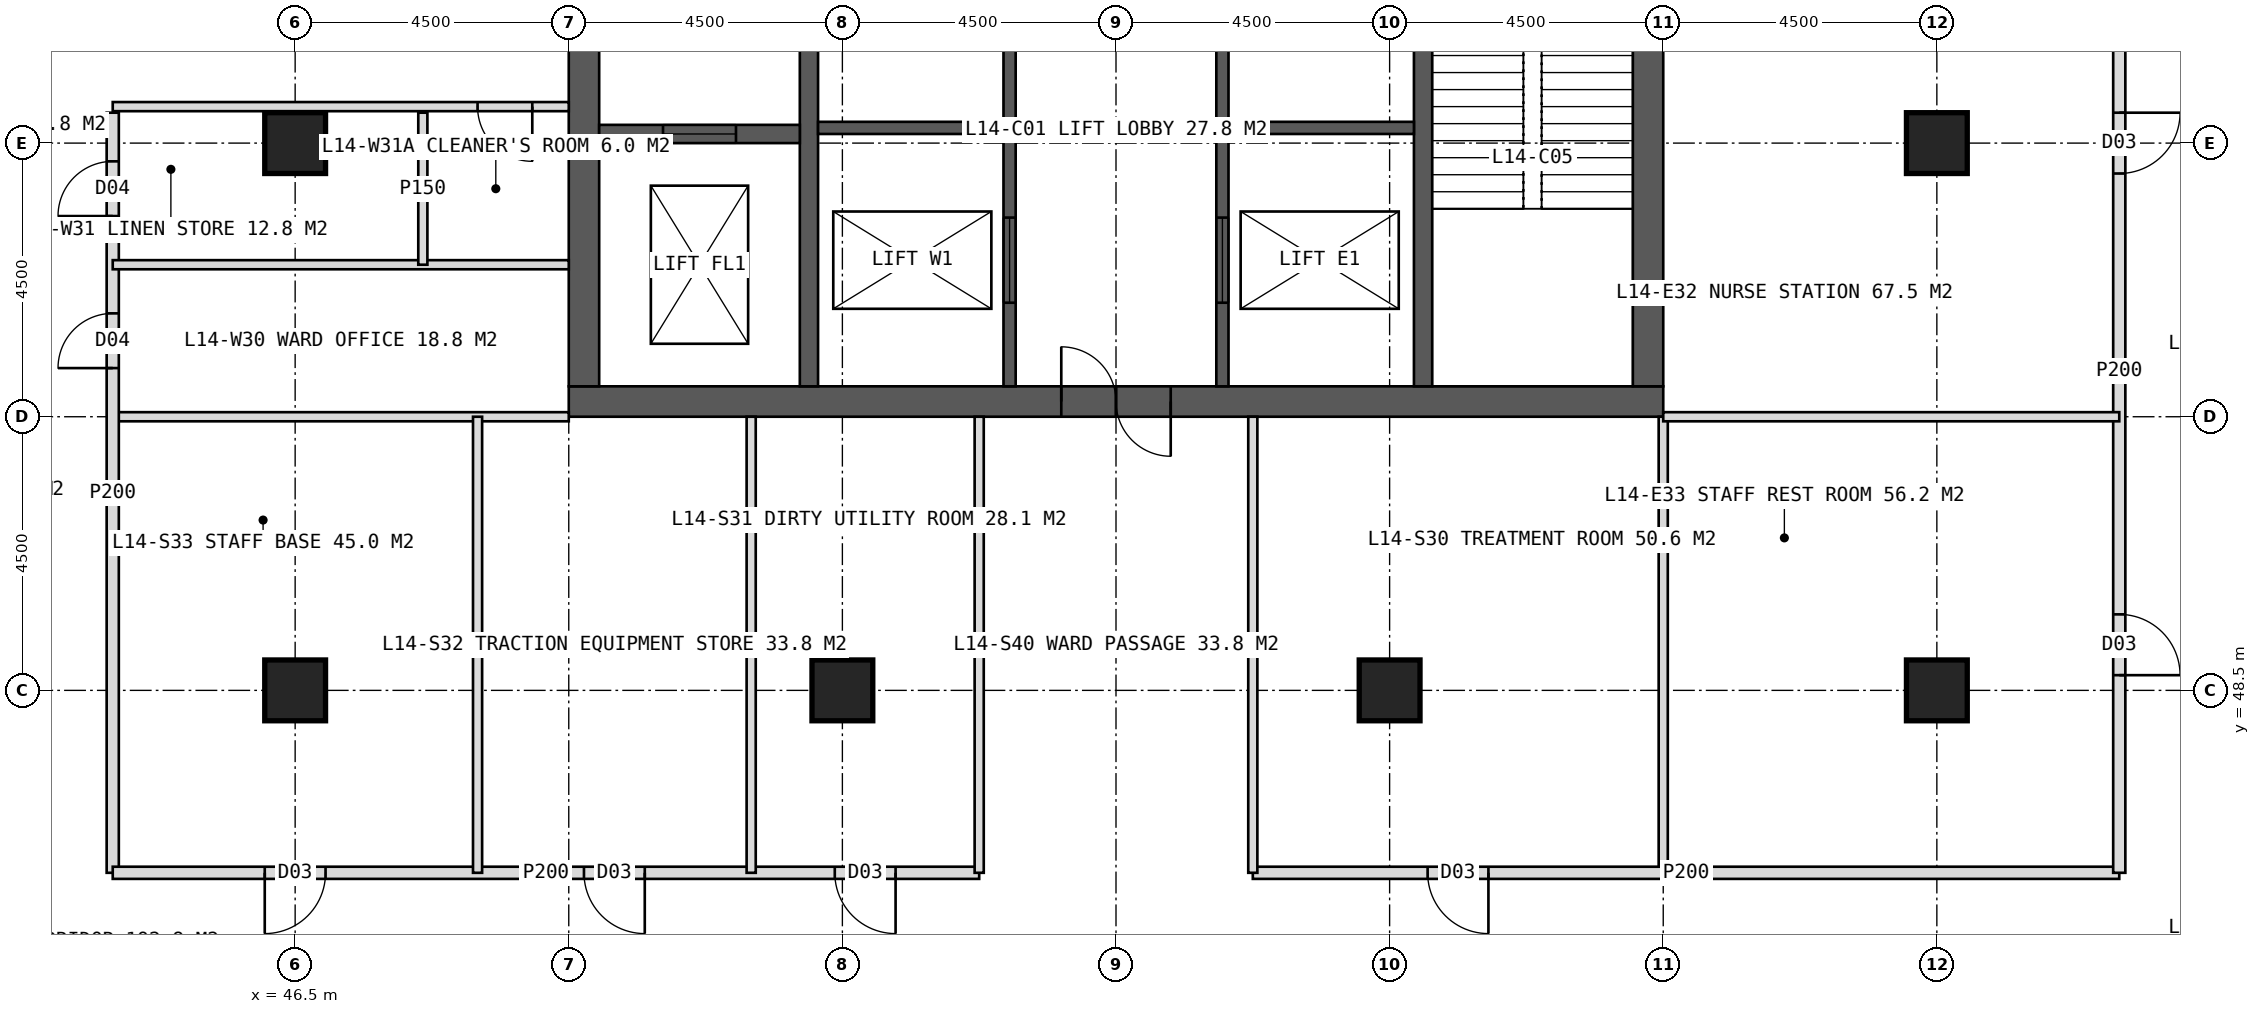
"""IFC4 building model, lengths in metres.
Left out: names, types, materials, properties, quantities, classifications, styles, units other than length and angle.
Written with IfcOpenShell. Run it as: python <this file> out.ifc"""

import sys

from ifc_helpers import new_model, si_unit, direction, frame, frame_2d, origin, origin_2d, place, context, subcontext, project, spatial, rectangle, hollow_rectangle, extrude, element, fill, save


model = new_model("IFC4")
c1 = context("Model", 3, precision=1e-05, world=origin(), true_north=direction((0.0, 1.0)))
c2 = subcontext(c1, "Body", "Model", "MODEL_VIEW")
j1 = project(units=[si_unit("LENGTHUNIT", "METRE"), si_unit("PLANEANGLEUNIT", "RADIAN")], contexts=[c1])
p1 = place(None, origin())
s1 = spatial("IfcSite", under=j1, at=p1, CompositionType="ELEMENT")
p2 = place(p1, origin())
s2 = spatial("IfcBuilding", under=s1, at=p2, CompositionType="ELEMENT")
p3 = place(p2, frame((0.0, 0.0, 63.0)))
s3 = spatial("IfcBuildingStorey", under=s2, at=p3, CompositionType="ELEMENT", Elevation=63.0)
p4 = place(p3, frame((51.0, 53.25, 0.0), z_axis=(0.0, 0.0, 1.0), x_axis=(1.0, 0.0, 0.0)))
e1 = element("IfcWall", 1, at=p4, inside=s3, PredefinedType="SHEAR", context=c2, shape_type="SweptSolid", body=[
    extrude(rectangle(XDim=18.0, YDim=0.5, at=frame_2d((9.0, 0.0))), origin(), (0.0, 0.0, 1.0), 4.0),
])
p5 = place(p4, frame((8.1, 0.0, 0.0)))
e2 = element("IfcOpeningElement", 2, at=p5, cuts=e1, PredefinedType="OPENING", context=c2, shape_type="SweptSolid", body=[
    extrude(rectangle(XDim=1.8, YDim=2.2, at=frame_2d((0.9, 1.1))), frame((0.0, 0.26, 0.0), z_axis=(0.0, -1.0, 0.0), x_axis=(1.0, 0.0, 0.0)), (0.0, 0.0, 1.0), 0.52),
])
p6 = place(p3, frame((51.25, 53.5, 0.0), z_axis=(0.0, 0.0, 1.0), x_axis=(0.0, 1.0, 0.0)))
e3 = element("IfcWall", 3, at=p6, inside=s3, PredefinedType="SHEAR", context=c2, shape_type="SweptSolid", body=[
    extrude(rectangle(XDim=17.0, YDim=0.5, at=frame_2d((8.5, 0.0))), origin(), (0.0, 0.0, 1.0), 4.0),
])
p7 = place(p6, frame((6.0, 0.0, 0.0)))
e4 = element("IfcOpeningElement", 4, at=p7, cuts=e3, PredefinedType="OPENING", context=c2, shape_type="SweptSolid", body=[
    extrude(rectangle(XDim=1.5, YDim=2.2, at=frame_2d((0.75, 1.1))), frame((0.0, 0.26, 0.0), z_axis=(0.0, -1.0, 0.0), x_axis=(1.0, 0.0, 0.0)), (0.0, 0.0, 1.0), 0.52),
])
p8 = place(p3, frame((68.75, 53.5, 0.0), z_axis=(0.0, 0.0, 1.0), x_axis=(0.0, 1.0, 0.0)))
e5 = element("IfcWall", 5, at=p8, inside=s3, PredefinedType="SHEAR", context=c2, shape_type="SweptSolid", body=[
    extrude(rectangle(XDim=17.0, YDim=0.5, at=frame_2d((8.5, 0.0))), origin(), (0.0, 0.0, 1.0), 4.0),
])
p9 = place(p8, frame((9.5, 0.0, 0.0)))
e6 = element("IfcOpeningElement", 6, at=p9, cuts=e5, PredefinedType="OPENING", context=c2, shape_type="SweptSolid", body=[
    extrude(rectangle(XDim=1.5, YDim=2.2, at=frame_2d((0.75, 1.1))), frame((0.0, 0.26, 0.0), z_axis=(0.0, -1.0, 0.0), x_axis=(1.0, 0.0, 0.0)), (0.0, 0.0, 1.0), 0.52),
])
for number, where, z_axis, x_axis in (
    (7, (54.95, 53.5, 0.0), (0.0, 0.0, 1.0), (0.0, 1.0, 0.0)),
    (8, (65.05, 53.5, 0.0), (0.0, 0.0, 1.0), (0.0, 1.0, 0.0)),
):
    element("IfcWall", number, at=place(p3, frame(where, z_axis=z_axis, x_axis=x_axis)), inside=s3, PredefinedType="SHEAR", context=c2, shape_type="SweptSolid", body=[
        extrude(rectangle(XDim=17.0, YDim=0.3, at=frame_2d((8.5, 0.0))), origin(), (0.0, 0.0, 1.0), 4.0),
    ])
p10 = place(p3, frame((58.25, 53.5, 0.0), z_axis=(0.0, 0.0, 1.0), x_axis=(0.0, 1.0, 0.0)))
e9 = element("IfcWall", 9, at=p10, inside=s3, PredefinedType="SHEAR", context=c2, shape_type="SweptSolid", body=[
    extrude(rectangle(XDim=17.0, YDim=0.2, at=frame_2d((8.5, 0.0))), origin(), (0.0, 0.0, 1.0), 4.0),
])
p11 = place(p10, frame((1.375, 0.0, 0.0)))
e10 = element("IfcOpeningElement", 10, at=p11, cuts=e9, PredefinedType="OPENING", context=c2, shape_type="SweptSolid", body=[
    extrude(rectangle(XDim=1.4, YDim=2.2, at=frame_2d((0.7, 1.1))), frame((0.0, 0.11, 0.0), z_axis=(0.0, -1.0, 0.0), x_axis=(1.0, 0.0, 0.0)), (0.0, 0.0, 1.0), 0.22),
])
p12 = place(p10, frame((5.675, 0.0, 0.0)))
e11 = element("IfcOpeningElement", 11, at=p12, cuts=e9, PredefinedType="OPENING", context=c2, shape_type="SweptSolid", body=[
    extrude(rectangle(XDim=1.4, YDim=2.2, at=frame_2d((0.7, 1.1))), frame((0.0, 0.11, 0.0), z_axis=(0.0, -1.0, 0.0), x_axis=(1.0, 0.0, 0.0)), (0.0, 0.0, 1.0), 0.22),
])
p13 = place(p3, frame((61.75, 53.5, 0.0), z_axis=(0.0, 0.0, 1.0), x_axis=(0.0, 1.0, 0.0)))
e12 = element("IfcWall", 12, at=p13, inside=s3, PredefinedType="SHEAR", context=c2, shape_type="SweptSolid", body=[
    extrude(rectangle(XDim=17.0, YDim=0.2, at=frame_2d((8.5, 0.0))), origin(), (0.0, 0.0, 1.0), 4.0),
])
p14 = place(p13, frame((1.375, 0.0, 0.0)))
e13 = element("IfcOpeningElement", 13, at=p14, cuts=e12, PredefinedType="OPENING", context=c2, shape_type="SweptSolid", body=[
    extrude(rectangle(XDim=1.4, YDim=2.2, at=frame_2d((0.7, 1.1))), frame((0.0, 0.11, 0.0), z_axis=(0.0, -1.0, 0.0), x_axis=(1.0, 0.0, 0.0)), (0.0, 0.0, 1.0), 0.22),
])
p15 = place(p13, frame((5.675, 0.0, 0.0)))
e14 = element("IfcOpeningElement", 14, at=p15, cuts=e12, PredefinedType="OPENING", context=c2, shape_type="SweptSolid", body=[
    extrude(rectangle(XDim=1.4, YDim=2.2, at=frame_2d((0.7, 1.1))), frame((0.0, 0.11, 0.0), z_axis=(0.0, -1.0, 0.0), x_axis=(1.0, 0.0, 0.0)), (0.0, 0.0, 1.0), 0.22),
])
for number, where, z_axis, x_axis in (
    (15, (55.1, 57.75, 0.0), (0.0, 0.0, 1.0), (1.0, 0.0, 0.0)),
    (16, (61.85, 57.75, 0.0), (0.0, 0.0, 1.0), (1.0, 0.0, 0.0)),
):
    element("IfcWall", number, at=place(p3, frame(where, z_axis=z_axis, x_axis=x_axis)), inside=s3, PredefinedType="SHEAR", context=c2, shape_type="SweptSolid", body=[
        extrude(rectangle(XDim=3.05, YDim=0.2, at=frame_2d((1.525, 0.0))), origin(), (0.0, 0.0, 1.0), 4.0),
    ])
p16 = place(p3, frame((51.5, 57.65, 0.0), z_axis=(0.0, 0.0, 1.0), x_axis=(1.0, 0.0, 0.0)))
e17 = element("IfcWall", 17, at=p16, inside=s3, PredefinedType="SHEAR", context=c2, shape_type="SweptSolid", body=[
    extrude(rectangle(XDim=3.3, YDim=0.3, at=frame_2d((1.65, 0.0))), origin(), (0.0, 0.0, 1.0), 4.0),
])
p17 = place(p16, frame((1.05, 0.0, 0.0)))
e18 = element("IfcOpeningElement", 18, at=p17, cuts=e17, PredefinedType="OPENING", context=c2, shape_type="SweptSolid", body=[
    extrude(rectangle(XDim=1.2, YDim=2.2, at=frame_2d((0.6, 1.1))), frame((0.0, 0.16, 0.0), z_axis=(0.0, -1.0, 0.0), x_axis=(1.0, 0.0, 0.0)), (0.0, 0.0, 1.0), 0.32),
])
for number, where, z_axis, x_axis in (
    (19, (46.5, 48.5, 0.0), (0.0, 0.0, 1.0), (1.0, 0.0, 0.0)),
    (20, (73.5, 48.5, 0.0), (0.0, 0.0, 1.0), (1.0, 0.0, 0.0)),
    (21, (55.5, 48.5, 0.0), (0.0, 0.0, 1.0), (1.0, 0.0, 0.0)),
    (22, (64.5, 48.5, 0.0), (0.0, 0.0, 1.0), (1.0, 0.0, 0.0)),
    (23, (46.5, 57.5, 0.0), (0.0, 0.0, 1.0), (1.0, 0.0, 0.0)),
    (24, (73.5, 57.5, 0.0), (0.0, 0.0, 1.0), (1.0, 0.0, 0.0)),
):
    element("IfcColumn", number, at=place(p3, frame(where, z_axis=z_axis, x_axis=x_axis)), inside=s3, PredefinedType="COLUMN", context=c2, shape_type="SweptSolid", body=[
        extrude(hollow_rectangle(XDim=1.0, YDim=1.0, WallThickness=0.1, at=origin_2d()), origin(), (0.0, 0.0, 1.0), 4.0),
    ])
p18 = place(p3, frame((51.0, 53.0, 0.0), z_axis=(0.0, 0.0, 1.0), x_axis=(-1.0, 0.0, 0.0)))
e25 = element("IfcWall", 25, at=p18, inside=s3, PredefinedType="PARTITIONING", context=c2, shape_type="SweptSolid", body=[
    extrude(rectangle(XDim=7.5, YDim=0.15, at=frame_2d((3.75, 0.0))), origin(), (0.0, 0.0, 1.0), 3.75),
])
p19 = place(p3, frame((43.5, 45.5, 0.0), z_axis=(0.0, 0.0, 1.0), x_axis=(0.0, 1.0, 0.0)))
e26 = element("IfcWall", 26, at=p19, inside=s3, PredefinedType="PARTITIONING", context=c2, shape_type="SweptSolid", body=[
    extrude(rectangle(XDim=12.5, YDim=0.2, at=frame_2d((6.25, 0.0))), origin(), (0.0, 0.0, 1.0), 3.75),
])
p20 = place(p19, frame((8.3, 0.0, 0.0)))
e27 = element("IfcOpeningElement", 27, at=p20, cuts=e26, PredefinedType="OPENING", context=c2, shape_type="SweptSolid", body=[
    extrude(rectangle(XDim=0.9, YDim=2.1, at=frame_2d((0.45, 1.05))), frame((0.0, 0.11, 0.0), z_axis=(0.0, -1.0, 0.0), x_axis=(1.0, 0.0, 0.0)), (0.0, 0.0, 1.0), 0.22),
])
p21 = place(p19, frame((10.8, 0.0, 0.0)))
e28 = element("IfcOpeningElement", 28, at=p21, cuts=e26, PredefinedType="OPENING", context=c2, shape_type="SweptSolid", body=[
    extrude(rectangle(XDim=0.9, YDim=2.1, at=frame_2d((0.45, 1.05))), frame((0.0, 0.11, 0.0), z_axis=(0.0, -1.0, 0.0), x_axis=(1.0, 0.0, 0.0)), (0.0, 0.0, 1.0), 0.22),
])
p22 = place(p3, frame((51.0, 58.1, 0.0), z_axis=(0.0, 0.0, 1.0), x_axis=(-1.0, 0.0, 0.0)))
e29 = element("IfcWall", 29, at=p22, inside=s3, PredefinedType="PARTITIONING", context=c2, shape_type="SweptSolid", body=[
    extrude(rectangle(XDim=7.5, YDim=0.15, at=frame_2d((3.75, 0.0))), origin(), (0.0, 0.0, 1.0), 3.75),
])
p23 = place(p22, frame((0.6, 0.0, 0.0)))
e30 = element("IfcOpeningElement", 30, at=p23, cuts=e29, PredefinedType="OPENING", context=c2, shape_type="SweptSolid", body=[
    extrude(rectangle(XDim=0.9, YDim=2.1, at=frame_2d((0.45, 1.05))), frame((0.0, 0.085, 0.0), z_axis=(0.0, -1.0, 0.0), x_axis=(1.0, 0.0, 0.0)), (0.0, 0.0, 1.0), 0.17),
])
p24 = place(p3, frame((51.0, 55.5, 0.0), z_axis=(0.0, 0.0, 1.0), x_axis=(-1.0, 0.0, 0.0)))
e31 = element("IfcWall", 31, at=p24, inside=s3, PredefinedType="PARTITIONING", context=c2, shape_type="SweptSolid", body=[
    extrude(rectangle(XDim=7.5, YDim=0.15, at=frame_2d((3.75, 0.0))), origin(), (0.0, 0.0, 1.0), 3.75),
])
p25 = place(p3, frame((48.6, 55.5, 0.0), z_axis=(0.0, 0.0, 1.0), x_axis=(0.0, 1.0, 0.0)))
e32 = element("IfcWall", 32, at=p25, inside=s3, PredefinedType="PARTITIONING", context=c2, shape_type="SweptSolid", body=[
    extrude(rectangle(XDim=2.5, YDim=0.15, at=frame_2d((1.25, 0.0))), origin(), (0.0, 0.0, 1.0), 3.75),
])
p26 = place(p3, frame((69.0, 53.0, 0.0), z_axis=(0.0, 0.0, 1.0), x_axis=(0.0, -1.0, 0.0)))
e33 = element("IfcWall", 33, at=p26, inside=s3, PredefinedType="PARTITIONING", context=c2, shape_type="SweptSolid", body=[
    extrude(rectangle(XDim=7.5, YDim=0.15, at=frame_2d((3.75, 0.0))), origin(), (0.0, 0.0, 1.0), 3.75),
])
p27 = place(p3, frame((76.5, 45.5, 0.0), z_axis=(0.0, 0.0, 1.0), x_axis=(-1.0, 0.0, 0.0)))
e34 = element("IfcWall", 34, at=p27, inside=s3, PredefinedType="PARTITIONING", context=c2, shape_type="SweptSolid", body=[
    extrude(rectangle(XDim=14.25, YDim=0.2, at=frame_2d((7.125, 0.0))), origin(), (0.0, 0.0, 1.0), 3.75),
])
p28 = place(p27, frame((10.375, 0.0, 0.0)))
e35 = element("IfcOpeningElement", 35, at=p28, cuts=e34, PredefinedType="OPENING", context=c2, shape_type="SweptSolid", body=[
    extrude(rectangle(XDim=1.0, YDim=2.1, at=frame_2d((0.5, 1.05))), frame((0.0, 0.11, 0.0), z_axis=(0.0, -1.0, 0.0), x_axis=(1.0, 0.0, 0.0)), (0.0, 0.0, 1.0), 0.22),
])
p29 = place(p3, frame((57.75, 45.5, 0.0), z_axis=(0.0, 0.0, 1.0), x_axis=(-1.0, 0.0, 0.0)))
e36 = element("IfcWall", 36, at=p29, inside=s3, PredefinedType="PARTITIONING", context=c2, shape_type="SweptSolid", body=[
    extrude(rectangle(XDim=14.25, YDim=0.2, at=frame_2d((7.125, 0.0))), origin(), (0.0, 0.0, 1.0), 3.75),
])
p30 = place(p29, frame((1.375, 0.0, 0.0)))
e37 = element("IfcOpeningElement", 37, at=p30, cuts=e36, PredefinedType="OPENING", context=c2, shape_type="SweptSolid", body=[
    extrude(rectangle(XDim=1.0, YDim=2.1, at=frame_2d((0.5, 1.05))), frame((0.0, 0.11, 0.0), z_axis=(0.0, -1.0, 0.0), x_axis=(1.0, 0.0, 0.0)), (0.0, 0.0, 1.0), 0.22),
])
p31 = place(p29, frame((5.5, 0.0, 0.0)))
e38 = element("IfcOpeningElement", 38, at=p31, cuts=e36, PredefinedType="OPENING", context=c2, shape_type="SweptSolid", body=[
    extrude(rectangle(XDim=1.0, YDim=2.1, at=frame_2d((0.5, 1.05))), frame((0.0, 0.11, 0.0), z_axis=(0.0, -1.0, 0.0), x_axis=(1.0, 0.0, 0.0)), (0.0, 0.0, 1.0), 0.22),
])
p32 = place(p29, frame((10.75, 0.0, 0.0)))
e39 = element("IfcOpeningElement", 39, at=p32, cuts=e36, PredefinedType="OPENING", context=c2, shape_type="SweptSolid", body=[
    extrude(rectangle(XDim=1.0, YDim=2.1, at=frame_2d((0.5, 1.05))), frame((0.0, 0.11, 0.0), z_axis=(0.0, -1.0, 0.0), x_axis=(1.0, 0.0, 0.0)), (0.0, 0.0, 1.0), 0.22),
])
for number, where, z_axis, x_axis in (
    (40, (62.25, 53.0, 0.0), (0.0, 0.0, 1.0), (0.0, -1.0, 0.0)),
    (41, (57.75, 53.0, 0.0), (0.0, 0.0, 1.0), (0.0, -1.0, 0.0)),
    (42, (54.0, 53.0, 0.0), (0.0, 0.0, 1.0), (0.0, -1.0, 0.0)),
    (43, (49.5, 53.0, 0.0), (0.0, 0.0, 1.0), (0.0, -1.0, 0.0)),
):
    element("IfcWall", number, at=place(p3, frame(where, z_axis=z_axis, x_axis=x_axis)), inside=s3, PredefinedType="PARTITIONING", context=c2, shape_type="SweptSolid", body=[
        extrude(rectangle(XDim=7.5, YDim=0.15, at=frame_2d((3.75, 0.0))), origin(), (0.0, 0.0, 1.0), 3.75),
    ])
p33 = place(p3, frame((76.5, 62.0, 0.0), z_axis=(0.0, 0.0, 1.0), x_axis=(0.0, -1.0, 0.0)))
e44 = element("IfcWall", 44, at=p33, inside=s3, PredefinedType="PARTITIONING", context=c2, shape_type="SweptSolid", body=[
    extrude(rectangle(XDim=16.5, YDim=0.2, at=frame_2d((8.25, 0.0))), origin(), (0.0, 0.0, 1.0), 3.75),
])
p34 = place(p33, frame((4.0, 0.0, 0.0)))
e45 = element("IfcOpeningElement", 45, at=p34, cuts=e44, PredefinedType="OPENING", context=c2, shape_type="SweptSolid", body=[
    extrude(rectangle(XDim=1.0, YDim=2.1, at=frame_2d((0.5, 1.05))), frame((0.0, 0.11, 0.0), z_axis=(0.0, -1.0, 0.0), x_axis=(1.0, 0.0, 0.0)), (0.0, 0.0, 1.0), 0.22),
])
p35 = place(p33, frame((12.25, 0.0, 0.0)))
e46 = element("IfcOpeningElement", 46, at=p35, cuts=e44, PredefinedType="OPENING", context=c2, shape_type="SweptSolid", body=[
    extrude(rectangle(XDim=1.0, YDim=2.1, at=frame_2d((0.5, 1.05))), frame((0.0, 0.11, 0.0), z_axis=(0.0, -1.0, 0.0), x_axis=(1.0, 0.0, 0.0)), (0.0, 0.0, 1.0), 0.22),
])
p36 = place(p3, frame((69.0, 53.0, 0.0), z_axis=(0.0, 0.0, 1.0), x_axis=(1.0, 0.0, 0.0)))
e47 = element("IfcWall", 47, at=p36, inside=s3, PredefinedType="PARTITIONING", context=c2, shape_type="SweptSolid", body=[
    extrude(rectangle(XDim=7.5, YDim=0.15, at=frame_2d((3.75, 0.0))), origin(), (0.0, 0.0, 1.0), 3.75),
])
p37 = place(p20, origin())
e48 = element("IfcDoor", 48, at=p37, inside=s3, OperationType="SINGLE_SWING_LEFT", PredefinedType="DOOR", context=c2, shape_type="SweptSolid", body=[
    extrude(rectangle(XDim=0.9, YDim=2.1, at=frame_2d((0.45, 1.05))), frame((0.0, 0.025, 0.0), z_axis=(0.0, -1.0, 0.0), x_axis=(1.0, 0.0, 0.0)), (0.0, 0.0, 1.0), 0.05),
])
fill(e27, e48)
p38 = place(p23, origin())
e49 = element("IfcDoor", 49, at=p38, inside=s3, OperationType="SINGLE_SWING_LEFT", PredefinedType="DOOR", context=c2, shape_type="SweptSolid", body=[
    extrude(rectangle(XDim=0.9, YDim=2.1, at=frame_2d((0.45, 1.05))), frame((0.0, 0.025, 0.0), z_axis=(0.0, -1.0, 0.0), x_axis=(1.0, 0.0, 0.0)), (0.0, 0.0, 1.0), 0.05),
])
fill(e30, e49)
p39 = place(p21, origin())
e50 = element("IfcDoor", 50, at=p39, inside=s3, OperationType="SINGLE_SWING_LEFT", PredefinedType="DOOR", context=c2, shape_type="SweptSolid", body=[
    extrude(rectangle(XDim=0.9, YDim=2.1, at=frame_2d((0.45, 1.05))), frame((0.0, 0.025, 0.0), z_axis=(0.0, -1.0, 0.0), x_axis=(1.0, 0.0, 0.0)), (0.0, 0.0, 1.0), 0.05),
])
fill(e28, e50)
p40 = place(p28, origin())
e51 = element("IfcDoor", 51, at=p40, inside=s3, OperationType="SINGLE_SWING_LEFT", PredefinedType="DOOR", context=c2, shape_type="SweptSolid", body=[
    extrude(rectangle(XDim=1.0, YDim=2.1, at=frame_2d((0.5, 1.05))), frame((0.0, 0.025, 0.0), z_axis=(0.0, -1.0, 0.0), x_axis=(1.0, 0.0, 0.0)), (0.0, 0.0, 1.0), 0.05),
])
fill(e35, e51)
p41 = place(p30, origin())
e52 = element("IfcDoor", 52, at=p41, inside=s3, OperationType="SINGLE_SWING_LEFT", PredefinedType="DOOR", context=c2, shape_type="SweptSolid", body=[
    extrude(rectangle(XDim=1.0, YDim=2.1, at=frame_2d((0.5, 1.05))), frame((0.0, 0.025, 0.0), z_axis=(0.0, -1.0, 0.0), x_axis=(1.0, 0.0, 0.0)), (0.0, 0.0, 1.0), 0.05),
])
fill(e37, e52)
p42 = place(p31, origin())
e53 = element("IfcDoor", 53, at=p42, inside=s3, OperationType="SINGLE_SWING_LEFT", PredefinedType="DOOR", context=c2, shape_type="SweptSolid", body=[
    extrude(rectangle(XDim=1.0, YDim=2.1, at=frame_2d((0.5, 1.05))), frame((0.0, 0.025, 0.0), z_axis=(0.0, -1.0, 0.0), x_axis=(1.0, 0.0, 0.0)), (0.0, 0.0, 1.0), 0.05),
])
fill(e38, e53)
p43 = place(p32, origin())
e54 = element("IfcDoor", 54, at=p43, inside=s3, OperationType="SINGLE_SWING_RIGHT", PredefinedType="DOOR", context=c2, shape_type="SweptSolid", body=[
    extrude(rectangle(XDim=1.0, YDim=2.1, at=frame_2d((0.5, 1.05))), frame((0.0, 0.025, 0.0), z_axis=(0.0, -1.0, 0.0), x_axis=(1.0, 0.0, 0.0)), (0.0, 0.0, 1.0), 0.05),
])
fill(e39, e54)
p44 = place(p34, origin())
e55 = element("IfcDoor", 55, at=p44, inside=s3, OperationType="SINGLE_SWING_LEFT", PredefinedType="DOOR", context=c2, shape_type="SweptSolid", body=[
    extrude(rectangle(XDim=1.0, YDim=2.1, at=frame_2d((0.5, 1.05))), frame((0.0, 0.025, 0.0), z_axis=(0.0, -1.0, 0.0), x_axis=(1.0, 0.0, 0.0)), (0.0, 0.0, 1.0), 0.05),
])
fill(e45, e55)
p45 = place(p35, origin())
e56 = element("IfcDoor", 56, at=p45, inside=s3, OperationType="SINGLE_SWING_RIGHT", PredefinedType="DOOR", context=c2, shape_type="SweptSolid", body=[
    extrude(rectangle(XDim=1.0, YDim=2.1, at=frame_2d((0.5, 1.05))), frame((0.0, 0.025, 0.0), z_axis=(0.0, -1.0, 0.0), x_axis=(1.0, 0.0, 0.0)), (0.0, 0.0, 1.0), 0.05),
])
fill(e46, e56)
p46 = place(p5, origin())
e57 = element("IfcDoor", 57, at=p46, inside=s3, OperationType="DOUBLE_DOOR_SINGLE_SWING", PredefinedType="DOOR", context=c2, shape_type="SweptSolid", body=[
    extrude(rectangle(XDim=1.8, YDim=2.2, at=frame_2d((0.9, 1.1))), frame((0.0, 0.025, 0.0), z_axis=(0.0, -1.0, 0.0), x_axis=(1.0, 0.0, 0.0)), (0.0, 0.0, 1.0), 0.05),
])
fill(e2, e57)
p47 = place(p17, origin())
e58 = element("IfcDoor", 58, at=p47, inside=s3, OperationType="SLIDING_TO_LEFT", PredefinedType="DOOR", context=c2, shape_type="SweptSolid", body=[
    extrude(rectangle(XDim=1.2, YDim=2.2, at=frame_2d((0.6, 1.1))), frame((0.0, 0.025, 0.0), z_axis=(0.0, -1.0, 0.0), x_axis=(1.0, 0.0, 0.0)), (0.0, 0.0, 1.0), 0.05),
])
fill(e18, e58)
p48 = place(p11, origin())
e59 = element("IfcDoor", 59, at=p48, inside=s3, OperationType="SLIDING_TO_LEFT", PredefinedType="DOOR", context=c2, shape_type="SweptSolid", body=[
    extrude(rectangle(XDim=1.4, YDim=2.2, at=frame_2d((0.7, 1.1))), frame((0.0, 0.025, 0.0), z_axis=(0.0, -1.0, 0.0), x_axis=(1.0, 0.0, 0.0)), (0.0, 0.0, 1.0), 0.05),
])
fill(e10, e59)
p49 = place(p14, origin())
e60 = element("IfcDoor", 60, at=p49, inside=s3, OperationType="SLIDING_TO_LEFT", PredefinedType="DOOR", context=c2, shape_type="SweptSolid", body=[
    extrude(rectangle(XDim=1.4, YDim=2.2, at=frame_2d((0.7, 1.1))), frame((0.0, 0.025, 0.0), z_axis=(0.0, -1.0, 0.0), x_axis=(1.0, 0.0, 0.0)), (0.0, 0.0, 1.0), 0.05),
])
fill(e13, e60)
save(model, sys.argv[1])
